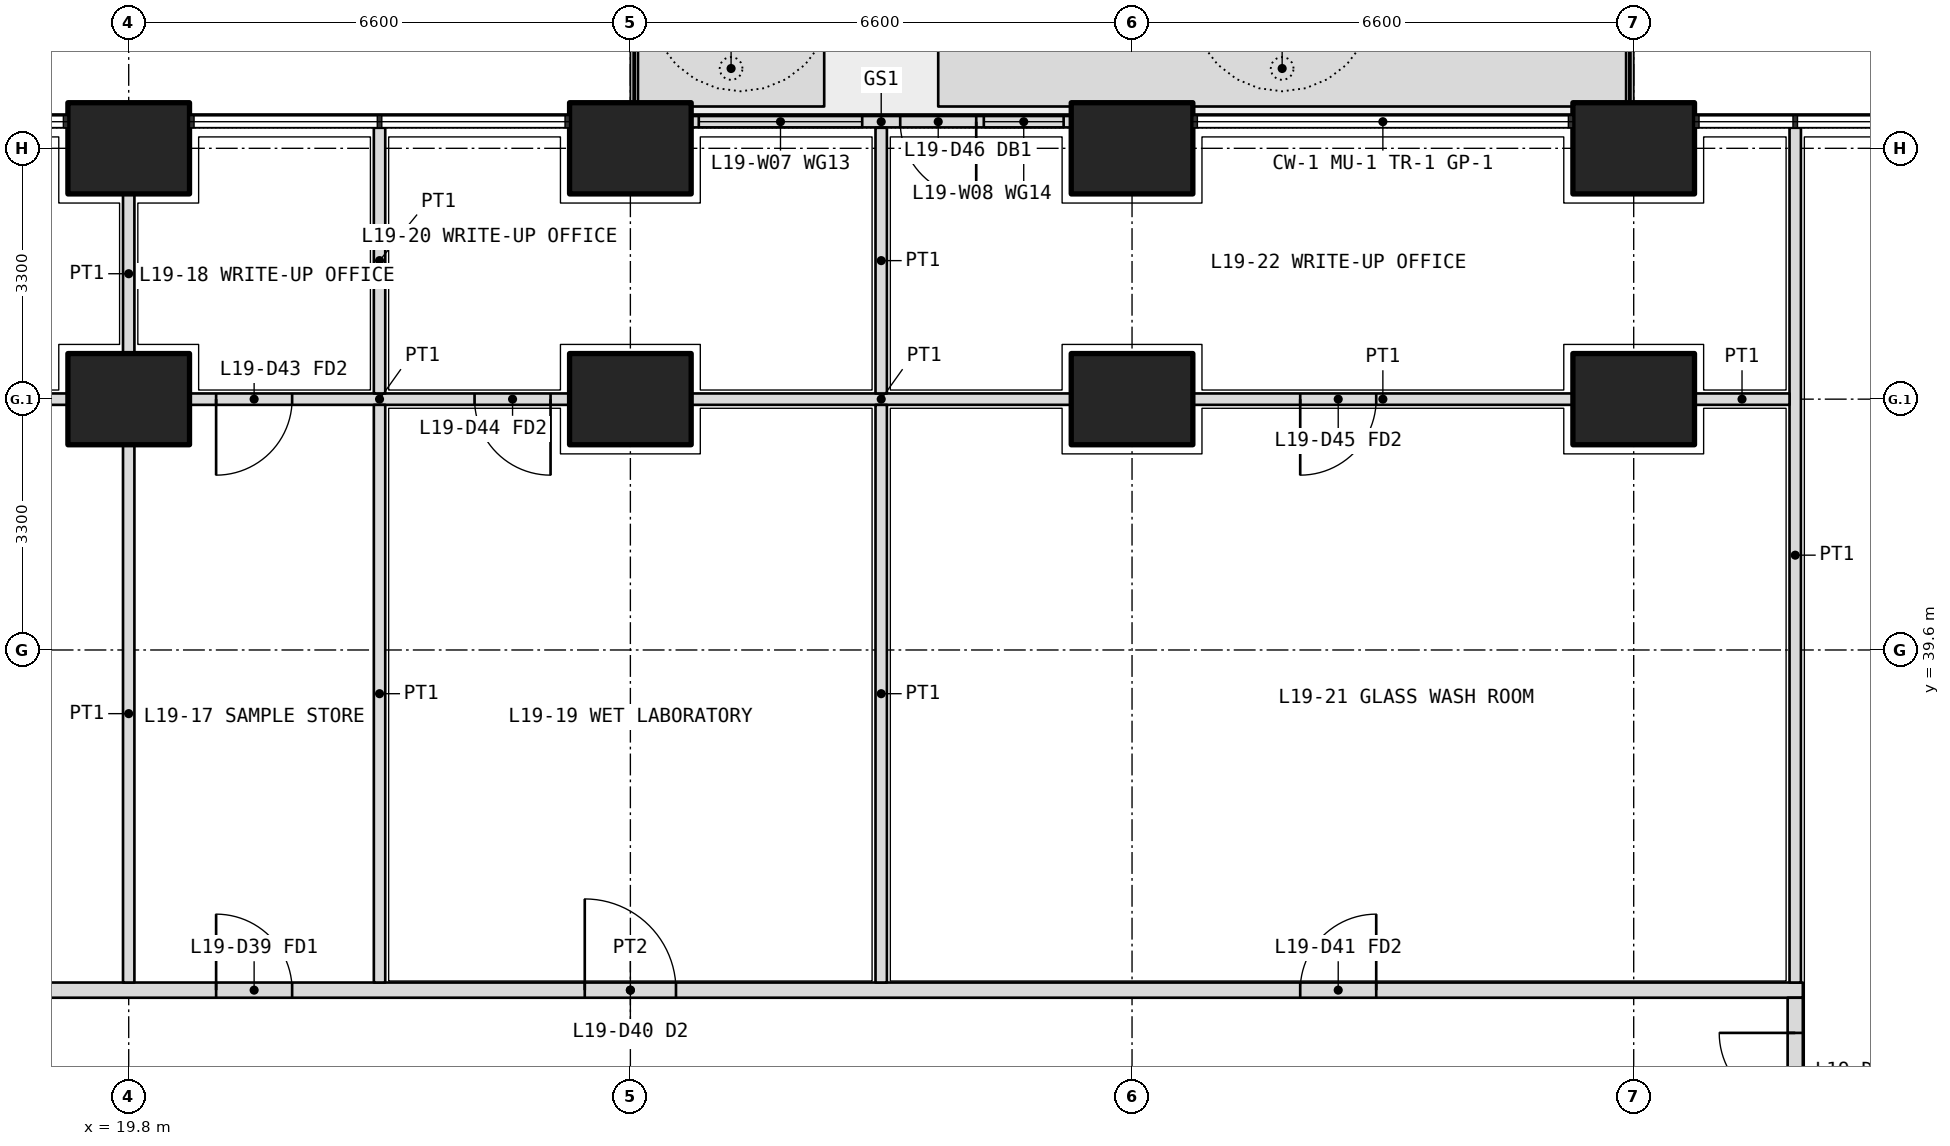
"""IFC4 building model, lengths in metres.
Left out: names, types, materials, properties, quantities, classifications, styles, units other than length and angle.
Written with IfcOpenShell. Run it as: python <this file> out.ifc"""

import sys

from ifc_helpers import new_model, si_unit, direction, frame, frame_2d, origin, origin_2d, place, context, subcontext, project, spatial, polyline, rectangle, outline, extrude, element, fill, save


model = new_model("IFC4")
c1 = context("Model", 3, precision=1e-05, world=origin(), true_north=direction((0.0, 1.0)))
c2 = subcontext(c1, "Body", "Model", "MODEL_VIEW")
j1 = project(units=[si_unit("LENGTHUNIT", "METRE"), si_unit("PLANEANGLEUNIT", "RADIAN")], contexts=[c1])
p1 = place(None, origin())
s1 = spatial("IfcSite", under=j1, at=p1, CompositionType="ELEMENT")
p2 = place(p1, origin())
s2 = spatial("IfcBuilding", under=s1, at=p2, CompositionType="ELEMENT")
p3 = place(p2, frame((0.0, 0.0, 86.4)))
s3 = spatial("IfcBuildingStorey", under=s2, at=p3, CompositionType="ELEMENT", Elevation=86.4)
for number, where, z_axis, x_axis in (
    (1, (19.8, 46.2, 0.0), (0.0, 0.0, 1.0), (1.0, 0.0, 0.0)),
    (2, (26.4, 46.2, 0.0), (0.0, 0.0, 1.0), (1.0, 0.0, 0.0)),
    (3, (33.0, 46.2, 0.0), (0.0, 0.0, 1.0), (1.0, 0.0, 0.0)),
    (4, (39.6, 46.2, 0.0), (0.0, 0.0, 1.0), (1.0, 0.0, 0.0)),
    (5, (19.8, 42.9, 0.0), (0.0, 0.0, 1.0), (1.0, 0.0, 0.0)),
    (6, (26.4, 42.9, 0.0), (0.0, 0.0, 1.0), (1.0, 0.0, 0.0)),
    (7, (33.0, 42.9, 0.0), (0.0, 0.0, 1.0), (1.0, 0.0, 0.0)),
    (8, (39.6, 42.9, 0.0), (0.0, 0.0, 1.0), (1.0, 0.0, 0.0)),
):
    element("IfcColumn", number, at=place(p3, frame(where, z_axis=z_axis, x_axis=x_axis)), inside=s3, PredefinedType="COLUMN", context=c2, shape_type="SweptSolid", body=[
        extrude(rectangle(XDim=1.6, YDim=1.2, at=origin_2d()), origin(), (0.0, 0.0, 1.0), 4.2),
    ])
p4 = place(p3, origin())
e9 = element("IfcWall", 9, at=p4, inside=s3, PredefinedType="USERDEFINED", context=c2, shape_type="SweptSolid", body=[
    extrude(outline(polyline([(26.5, 46.75), (28.95, 46.75), (28.95, 47.75), (26.5, 47.75), (26.5, 46.75)]), holes=[polyline([(26.65, 46.9), (28.8, 46.9), (28.8, 47.6), (26.65, 47.6), (26.65, 46.9)])]), origin(), (0.0, 0.0, 1.0), 1.05),
])
p5 = place(p3, origin())
e10 = element("IfcWall", 10, at=p5, inside=s3, PredefinedType="USERDEFINED", context=c2, shape_type="SweptSolid", body=[
    extrude(outline(polyline([(30.45, 46.75), (39.5, 46.75), (39.5, 47.75), (30.45, 47.75), (30.45, 46.75)]), holes=[polyline([(30.6, 46.9), (39.35, 46.9), (39.35, 47.6), (30.6, 47.6), (30.6, 46.9)])]), origin(), (0.0, 0.0, 1.0), 1.05),
])
p6 = place(p3, frame((32.2, 46.55, 0.0), z_axis=(0.0, 0.0, 1.0), x_axis=(-1.0, 0.0, 0.0)))
e11 = element("IfcWall", 11, at=p6, inside=s3, PredefinedType="SOLIDWALL", context=c2, shape_type="SweptSolid", body=[
    extrude(rectangle(XDim=5.0, YDim=0.15, at=frame_2d((2.5, 0.0))), origin(), (0.0, 0.0, 1.0), 2.7),
])
p7 = place(p6, frame((1.25, 0.0, 0.0)))
e12 = element("IfcOpeningElement", 12, at=p7, cuts=e11, PredefinedType="OPENING", context=c2, shape_type="SweptSolid", body=[
    extrude(rectangle(XDim=1.0, YDim=2.4, at=frame_2d((0.5, 1.2))), frame((0.0, 0.085, 0.0), z_axis=(0.0, -1.0, 0.0), x_axis=(1.0, 0.0, 0.0)), (0.0, 0.0, 1.0), 0.17),
])
p8 = place(p6, frame((0.1, 0.0, 0.1)))
e13 = element("IfcOpeningElement", 13, at=p8, cuts=e11, PredefinedType="OPENING", context=c2, shape_type="SweptSolid", body=[
    extrude(rectangle(XDim=1.05, YDim=2.3, at=frame_2d((0.525, 1.15))), frame((0.0, 0.085, 0.0), z_axis=(0.0, -1.0, 0.0), x_axis=(1.0, 0.0, 0.0)), (0.0, 0.0, 1.0), 0.17),
])
p9 = place(p6, frame((2.75, 0.0, 0.1)))
e14 = element("IfcOpeningElement", 14, at=p9, cuts=e11, PredefinedType="OPENING", context=c2, shape_type="SweptSolid", body=[
    extrude(rectangle(XDim=2.15, YDim=2.3, at=frame_2d((1.075, 1.15))), frame((0.0, 0.085, 0.0), z_axis=(0.0, -1.0, 0.0), x_axis=(1.0, 0.0, 0.0)), (0.0, 0.0, 1.0), 0.17),
])
p10 = place(p3, frame((10.975, 35.125, 0.0), z_axis=(0.0, 0.0, 1.0), x_axis=(1.0, 0.0, 0.0)))
e15 = element("IfcWall", 15, at=p10, inside=s3, PredefinedType="PARTITIONING", context=c2, shape_type="SweptSolid", body=[
    extrude(rectangle(XDim=30.85, YDim=0.2, at=frame_2d((15.425, 0.0))), origin(), (0.0, 0.0, 1.0), 2.85),
])
p11 = place(p10, frame((3.962, 0.0, 0.0)))
e16 = element("IfcOpeningElement", 16, at=p11, cuts=e15, PredefinedType="OPENING", context=c2, shape_type="SweptSolid", body=[
    extrude(rectangle(XDim=1.0, YDim=2.1, at=frame_2d((0.5, 1.05))), frame((0.0, 0.11, 0.0), z_axis=(0.0, -1.0, 0.0), x_axis=(1.0, 0.0, 0.0)), (0.0, 0.0, 1.0), 0.22),
])
p12 = place(p10, frame((9.975, 0.0, 0.0)))
e17 = element("IfcOpeningElement", 17, at=p12, cuts=e15, PredefinedType="OPENING", context=c2, shape_type="SweptSolid", body=[
    extrude(rectangle(XDim=1.0, YDim=2.1, at=frame_2d((0.5, 1.05))), frame((0.0, 0.11, 0.0), z_axis=(0.0, -1.0, 0.0), x_axis=(1.0, 0.0, 0.0)), (0.0, 0.0, 1.0), 0.22),
])
p13 = place(p10, frame((14.825, 0.0, 0.0)))
e18 = element("IfcOpeningElement", 18, at=p13, cuts=e15, PredefinedType="OPENING", context=c2, shape_type="SweptSolid", body=[
    extrude(rectangle(XDim=1.2, YDim=2.1, at=frame_2d((0.6, 1.05))), frame((0.0, 0.11, 0.0), z_axis=(0.0, -1.0, 0.0), x_axis=(1.0, 0.0, 0.0)), (0.0, 0.0, 1.0), 0.22),
])
p14 = place(p10, frame((24.238, 0.0, 0.0)))
e19 = element("IfcOpeningElement", 19, at=p14, cuts=e15, PredefinedType="OPENING", context=c2, shape_type="SweptSolid", body=[
    extrude(rectangle(XDim=1.0, YDim=2.1, at=frame_2d((0.5, 1.05))), frame((0.0, 0.11, 0.0), z_axis=(0.0, -1.0, 0.0), x_axis=(1.0, 0.0, 0.0)), (0.0, 0.0, 1.0), 0.22),
])
p15 = place(p3, frame((41.725, 7.4, 0.0), z_axis=(0.0, 0.0, 1.0), x_axis=(0.0, 1.0, 0.0)))
e20 = element("IfcWall", 20, at=p15, inside=s3, PredefinedType="PARTITIONING", context=c2, shape_type="SweptSolid", body=[
    extrude(rectangle(XDim=27.625, YDim=0.2, at=frame_2d((13.812, 0.0))), origin(), (0.0, 0.0, 1.0), 2.85),
])
p16 = place(p15, frame((5.65, 0.0, 0.0)))
e21 = element("IfcOpeningElement", 21, at=p16, cuts=e20, PredefinedType="OPENING", context=c2, shape_type="SweptSolid", body=[
    extrude(rectangle(XDim=1.0, YDim=2.1, at=frame_2d((0.5, 1.05))), frame((0.0, 0.11, 0.0), z_axis=(0.0, -1.0, 0.0), x_axis=(1.0, 0.0, 0.0)), (0.0, 0.0, 1.0), 0.22),
])
p17 = place(p15, frame((13.5, 0.0, 0.0)))
e22 = element("IfcOpeningElement", 22, at=p17, cuts=e20, PredefinedType="OPENING", context=c2, shape_type="SweptSolid", body=[
    extrude(rectangle(XDim=1.0, YDim=2.1, at=frame_2d((0.5, 1.05))), frame((0.0, 0.11, 0.0), z_axis=(0.0, -1.0, 0.0), x_axis=(1.0, 0.0, 0.0)), (0.0, 0.0, 1.0), 0.22),
])
p18 = place(p15, frame((16.85, 0.0, 0.0)))
e23 = element("IfcOpeningElement", 23, at=p18, cuts=e20, PredefinedType="OPENING", context=c2, shape_type="SweptSolid", body=[
    extrude(rectangle(XDim=0.9, YDim=2.1, at=frame_2d((0.45, 1.05))), frame((0.0, 0.11, 0.0), z_axis=(0.0, -1.0, 0.0), x_axis=(1.0, 0.0, 0.0)), (0.0, 0.0, 1.0), 0.22),
])
p19 = place(p15, frame((21.8, 0.0, 0.0)))
e24 = element("IfcOpeningElement", 24, at=p19, cuts=e20, PredefinedType="OPENING", context=c2, shape_type="SweptSolid", body=[
    extrude(rectangle(XDim=1.0, YDim=2.1, at=frame_2d((0.5, 1.05))), frame((0.0, 0.11, 0.0), z_axis=(0.0, -1.0, 0.0), x_axis=(1.0, 0.0, 0.0)), (0.0, 0.0, 1.0), 0.22),
])
p20 = place(p15, frame((26.163, 0.0, 0.0)))
e25 = element("IfcOpeningElement", 25, at=p20, cuts=e20, PredefinedType="OPENING", context=c2, shape_type="SweptSolid", body=[
    extrude(rectangle(XDim=1.0, YDim=2.1, at=frame_2d((0.5, 1.05))), frame((0.0, 0.11, 0.0), z_axis=(0.0, -1.0, 0.0), x_axis=(1.0, 0.0, 0.0)), (0.0, 0.0, 1.0), 0.22),
])
p21 = place(p3, frame((41.725, 46.47, 0.0), z_axis=(0.0, 0.0, 1.0), x_axis=(0.0, -1.0, 0.0)))
e26 = element("IfcWall", 26, at=p21, inside=s3, PredefinedType="PARTITIONING", context=c2, shape_type="SweptSolid", body=[
    extrude(rectangle(XDim=11.245, YDim=0.15, at=frame_2d((5.623, 0.0))), origin(), (0.0, 0.0, 1.0), 2.7),
])
p22 = place(p3, frame((41.65, 42.9, 0.0), z_axis=(0.0, 0.0, 1.0), x_axis=(-1.0, 0.0, 0.0)))
e27 = element("IfcWall", 27, at=p22, inside=s3, PredefinedType="PARTITIONING", context=c2, shape_type="SweptSolid", body=[
    extrude(rectangle(XDim=1.25, YDim=0.15, at=frame_2d((0.625, 0.0))), origin(), (0.0, 0.0, 1.0), 3.9),
])
p23 = place(p3, frame((38.8, 42.9, 0.0), z_axis=(0.0, 0.0, 1.0), x_axis=(-1.0, 0.0, 0.0)))
e28 = element("IfcWall", 28, at=p23, inside=s3, PredefinedType="PARTITIONING", context=c2, shape_type="SweptSolid", body=[
    extrude(rectangle(XDim=5.0, YDim=0.15, at=frame_2d((2.5, 0.0))), origin(), (0.0, 0.0, 1.0), 3.9),
])
p24 = place(p23, frame((2.587, 0.0, 0.0)))
e29 = element("IfcOpeningElement", 29, at=p24, cuts=e28, PredefinedType="OPENING", context=c2, shape_type="SweptSolid", body=[
    extrude(rectangle(XDim=1.0, YDim=2.1, at=frame_2d((0.5, 1.05))), frame((0.0, 0.085, 0.0), z_axis=(0.0, -1.0, 0.0), x_axis=(1.0, 0.0, 0.0)), (0.0, 0.0, 1.0), 0.17),
])
p25 = place(p3, frame((32.2, 42.9, 0.0), z_axis=(0.0, 0.0, 1.0), x_axis=(-1.0, 0.0, 0.0)))
e30 = element("IfcWall", 30, at=p25, inside=s3, PredefinedType="PARTITIONING", context=c2, shape_type="SweptSolid", body=[
    extrude(rectangle(XDim=5.0, YDim=0.15, at=frame_2d((2.5, 0.0))), origin(), (0.0, 0.0, 1.0), 3.9),
])
p26 = place(p3, frame((25.6, 42.9, 0.0), z_axis=(0.0, 0.0, 1.0), x_axis=(-1.0, 0.0, 0.0)))
e31 = element("IfcWall", 31, at=p26, inside=s3, PredefinedType="PARTITIONING", context=c2, shape_type="SweptSolid", body=[
    extrude(rectangle(XDim=5.0, YDim=0.15, at=frame_2d((2.5, 0.0))), origin(), (0.0, 0.0, 1.0), 3.9),
])
p27 = place(p26, frame((3.65, 0.0, 0.0)))
e32 = element("IfcOpeningElement", 32, at=p27, cuts=e31, PredefinedType="OPENING", context=c2, shape_type="SweptSolid", body=[
    extrude(rectangle(XDim=1.0, YDim=2.1, at=frame_2d((0.5, 1.05))), frame((0.0, 0.085, 0.0), z_axis=(0.0, -1.0, 0.0), x_axis=(1.0, 0.0, 0.0)), (0.0, 0.0, 1.0), 0.17),
])
p28 = place(p26, frame((0.25, 0.0, 0.0)))
e33 = element("IfcOpeningElement", 33, at=p28, cuts=e31, PredefinedType="OPENING", context=c2, shape_type="SweptSolid", body=[
    extrude(rectangle(XDim=1.0, YDim=2.1, at=frame_2d((0.5, 1.05))), frame((0.0, 0.085, 0.0), z_axis=(0.0, -1.0, 0.0), x_axis=(1.0, 0.0, 0.0)), (0.0, 0.0, 1.0), 0.17),
])
p29 = place(p3, frame((19.0, 42.9, 0.0), z_axis=(0.0, 0.0, 1.0), x_axis=(-1.0, 0.0, 0.0)))
e34 = element("IfcWall", 34, at=p29, inside=s3, PredefinedType="PARTITIONING", context=c2, shape_type="SweptSolid", body=[
    extrude(rectangle(XDim=5.0, YDim=0.15, at=frame_2d((2.5, 0.0))), origin(), (0.0, 0.0, 1.0), 3.9),
])
p30 = place(p3, frame((19.8, 45.6, 0.0), z_axis=(0.0, 0.0, 1.0), x_axis=(0.0, -1.0, 0.0)))
e35 = element("IfcWall", 35, at=p30, inside=s3, PredefinedType="PARTITIONING", context=c2, shape_type="SweptSolid", body=[
    extrude(rectangle(XDim=2.1, YDim=0.15, at=frame_2d((1.05, 0.0))), origin(), (0.0, 0.0, 1.0), 2.85),
])
p31 = place(p3, frame((19.8, 42.3, 0.0), z_axis=(0.0, 0.0, 1.0), x_axis=(0.0, -1.0, 0.0)))
e36 = element("IfcWall", 36, at=p31, inside=s3, PredefinedType="PARTITIONING", context=c2, shape_type="SweptSolid", body=[
    extrude(rectangle(XDim=7.075, YDim=0.15, at=frame_2d((3.538, 0.0))), origin(), (0.0, 0.0, 1.0), 2.85),
])
p32 = place(p3, frame((23.1, 46.47, 0.0), z_axis=(0.0, 0.0, 1.0), x_axis=(0.0, -1.0, 0.0)))
e37 = element("IfcWall", 37, at=p32, inside=s3, PredefinedType="PARTITIONING", context=c2, shape_type="SweptSolid", body=[
    extrude(rectangle(XDim=3.495, YDim=0.15, at=frame_2d((1.748, 0.0))), origin(), (0.0, 0.0, 1.0), 2.7),
])
p33 = place(p3, frame((23.1, 42.825, 0.0), z_axis=(0.0, 0.0, 1.0), x_axis=(0.0, -1.0, 0.0)))
e38 = element("IfcWall", 38, at=p33, inside=s3, PredefinedType="PARTITIONING", context=c2, shape_type="SweptSolid", body=[
    extrude(rectangle(XDim=7.6, YDim=0.15, at=frame_2d((3.8, 0.0))), origin(), (0.0, 0.0, 1.0), 3.9),
])
p34 = place(p3, frame((29.7, 46.47, 0.0), z_axis=(0.0, 0.0, 1.0), x_axis=(0.0, -1.0, 0.0)))
e39 = element("IfcWall", 39, at=p34, inside=s3, PredefinedType="PARTITIONING", context=c2, shape_type="SweptSolid", body=[
    extrude(rectangle(XDim=3.495, YDim=0.15, at=frame_2d((1.748, 0.0))), origin(), (0.0, 0.0, 1.0), 2.7),
])
p35 = place(p3, frame((29.7, 42.825, 0.0), z_axis=(0.0, 0.0, 1.0), x_axis=(0.0, -1.0, 0.0)))
e40 = element("IfcWall", 40, at=p35, inside=s3, PredefinedType="PARTITIONING", context=c2, shape_type="SweptSolid", body=[
    extrude(rectangle(XDim=7.6, YDim=0.15, at=frame_2d((3.8, 0.0))), origin(), (0.0, 0.0, 1.0), 3.9),
])
p36 = place(p7, origin())
e41 = element("IfcDoor", 41, at=p36, inside=s3, OperationType="SINGLE_SWING_LEFT", PredefinedType="DOOR", context=c2, shape_type="SweptSolid", body=[
    extrude(rectangle(XDim=1.0, YDim=2.4, at=frame_2d((0.5, 1.2))), frame((0.0, 0.025, 0.0), z_axis=(0.0, -1.0, 0.0), x_axis=(1.0, 0.0, 0.0)), (0.0, 0.0, 1.0), 0.05),
])
fill(e12, e41)
p37 = place(p8, origin())
e42 = element("IfcWindow", 42, at=p37, inside=s3, PartitioningType="SINGLE_PANEL", PredefinedType="WINDOW", context=c2, shape_type="SweptSolid", body=[
    extrude(rectangle(XDim=1.05, YDim=2.3, at=frame_2d((0.525, 1.15))), frame((0.0, 0.03, 0.0), z_axis=(0.0, -1.0, 0.0), x_axis=(1.0, 0.0, 0.0)), (0.0, 0.0, 1.0), 0.06),
])
fill(e13, e42)
p38 = place(p9, origin())
e43 = element("IfcWindow", 43, at=p38, inside=s3, PartitioningType="SINGLE_PANEL", PredefinedType="WINDOW", context=c2, shape_type="SweptSolid", body=[
    extrude(rectangle(XDim=2.15, YDim=2.3, at=frame_2d((1.075, 1.15))), frame((0.0, 0.03, 0.0), z_axis=(0.0, -1.0, 0.0), x_axis=(1.0, 0.0, 0.0)), (0.0, 0.0, 1.0), 0.06),
])
fill(e14, e43)
p39 = place(p20, origin())
e44 = element("IfcDoor", 44, at=p39, inside=s3, OperationType="SINGLE_SWING_RIGHT", PredefinedType="DOOR", context=c2, shape_type="SweptSolid", body=[
    extrude(rectangle(XDim=1.0, YDim=2.1, at=frame_2d((0.5, 1.05))), frame((0.0, 0.025, 0.0), z_axis=(0.0, -1.0, 0.0), x_axis=(1.0, 0.0, 0.0)), (0.0, 0.0, 1.0), 0.05),
])
fill(e25, e44)
p40 = place(p12, origin())
e45 = element("IfcDoor", 45, at=p40, inside=s3, OperationType="SINGLE_SWING_LEFT", PredefinedType="DOOR", context=c2, shape_type="SweptSolid", body=[
    extrude(rectangle(XDim=1.0, YDim=2.1, at=frame_2d((0.5, 1.05))), frame((0.0, 0.025, 0.0), z_axis=(0.0, -1.0, 0.0), x_axis=(1.0, 0.0, 0.0)), (0.0, 0.0, 1.0), 0.05),
])
fill(e17, e45)
p41 = place(p27, origin())
e46 = element("IfcDoor", 46, at=p41, inside=s3, OperationType="SINGLE_SWING_RIGHT", PredefinedType="DOOR", context=c2, shape_type="SweptSolid", body=[
    extrude(rectangle(XDim=1.0, YDim=2.1, at=frame_2d((0.5, 1.05))), frame((0.0, 0.025, 0.0), z_axis=(0.0, -1.0, 0.0), x_axis=(1.0, 0.0, 0.0)), (0.0, 0.0, 1.0), 0.05),
])
fill(e32, e46)
p42 = place(p13, origin())
e47 = element("IfcDoor", 47, at=p42, inside=s3, OperationType="DOUBLE_DOOR_SINGLE_SWING", PredefinedType="DOOR", context=c2, shape_type="SweptSolid", body=[
    extrude(rectangle(XDim=1.2, YDim=2.1, at=frame_2d((0.6, 1.05))), frame((0.0, 0.025, 0.0), z_axis=(0.0, -1.0, 0.0), x_axis=(1.0, 0.0, 0.0)), (0.0, 0.0, 1.0), 0.05),
])
fill(e18, e47)
p43 = place(p28, origin())
e48 = element("IfcDoor", 48, at=p43, inside=s3, OperationType="SINGLE_SWING_LEFT", PredefinedType="DOOR", context=c2, shape_type="SweptSolid", body=[
    extrude(rectangle(XDim=1.0, YDim=2.1, at=frame_2d((0.5, 1.05))), frame((0.0, 0.025, 0.0), z_axis=(0.0, -1.0, 0.0), x_axis=(1.0, 0.0, 0.0)), (0.0, 0.0, 1.0), 0.05),
])
fill(e33, e48)
p44 = place(p14, origin())
e49 = element("IfcDoor", 49, at=p44, inside=s3, OperationType="SINGLE_SWING_RIGHT", PredefinedType="DOOR", context=c2, shape_type="SweptSolid", body=[
    extrude(rectangle(XDim=1.0, YDim=2.1, at=frame_2d((0.5, 1.05))), frame((0.0, 0.025, 0.0), z_axis=(0.0, -1.0, 0.0), x_axis=(1.0, 0.0, 0.0)), (0.0, 0.0, 1.0), 0.05),
])
fill(e19, e49)
p45 = place(p24, origin())
e50 = element("IfcDoor", 50, at=p45, inside=s3, OperationType="SINGLE_SWING_RIGHT", PredefinedType="DOOR", context=c2, shape_type="SweptSolid", body=[
    extrude(rectangle(XDim=1.0, YDim=2.1, at=frame_2d((0.5, 1.05))), frame((0.0, 0.025, 0.0), z_axis=(0.0, -1.0, 0.0), x_axis=(1.0, 0.0, 0.0)), (0.0, 0.0, 1.0), 0.05),
])
fill(e29, e50)
save(model, sys.argv[1])
